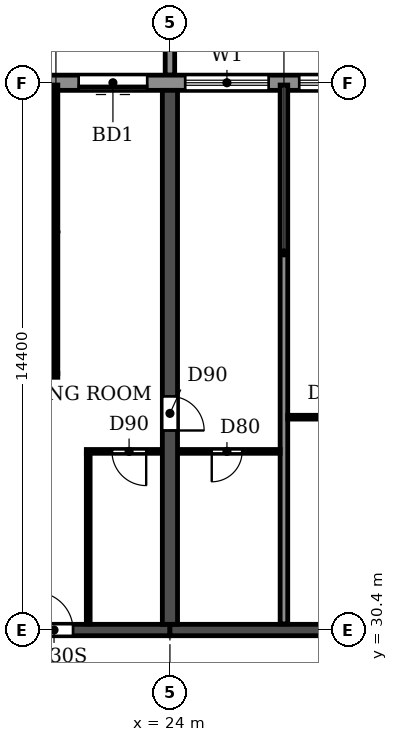
"""IFC4 building model, lengths in metres.
Left out: names, types, materials, properties, quantities, classifications, styles, units other than length and angle.
Written with IfcOpenShell. Run it as: python <this file> out.ifc"""

import sys

from ifc_helpers import new_model, si_unit, direction, frame, frame_2d, origin, place, context, subcontext, project, spatial, polyline, rectangle, outline, extrude, source, transform, mapped, element, fill, save


model = new_model("IFC4")
c1 = context("Model", 3, precision=1e-05, world=origin(), true_north=direction((0.0, 1.0)))
c2 = subcontext(c1, "Body", "Model", "MODEL_VIEW")
j1 = project(units=[si_unit("LENGTHUNIT", "METRE"), si_unit("PLANEANGLEUNIT", "RADIAN")], contexts=[c1])
p1 = place(None, origin())
s1 = spatial("IfcSite", under=j1, at=p1, CompositionType="ELEMENT")
p2 = place(p1, origin())
s2 = spatial("IfcBuilding", under=s1, at=p2, CompositionType="ELEMENT")
p3 = place(p2, frame((0.0, 0.0, 49.8)))
s3 = spatial("IfcBuildingStorey", under=s2, at=p3, CompositionType="ELEMENT", Elevation=49.8)
p4 = place(p3, frame((24.0, 30.55, 0.0), z_axis=(0.0, 0.0, 1.0), x_axis=(0.0, 1.0, 0.0)))
e1 = element("IfcWall", 1, at=p4, inside=s3, PredefinedType="SHEAR", context=c2, shape_type="SweptSolid", body=[
    extrude(rectangle(XDim=14.05, YDim=0.4, at=frame_2d((7.025, 0.0))), origin(), (0.0, 0.0, 1.0), 3.0),
])
p5 = place(p4, frame((5.1, 0.0, 0.0)))
e2 = element("IfcOpeningElement", 2, at=p5, cuts=e1, PredefinedType="OPENING", context=c2, shape_type="SweptSolid", body=[
    extrude(rectangle(XDim=0.9, YDim=2.1, at=frame_2d((0.45, 1.05))), frame((0.0, 0.21, 0.0), z_axis=(0.0, -1.0, 0.0), x_axis=(1.0, 0.0, 0.0)), (0.0, 0.0, 1.0), 0.42),
])
p6 = place(p3, frame((18.0, 30.4, 0.0), z_axis=(0.0, 0.0, 1.0), x_axis=(1.0, 0.0, 0.0)))
e3 = element("IfcWall", 3, at=p6, inside=s3, PredefinedType="SHEAR", context=c2, shape_type="SweptSolid", body=[
    extrude(rectangle(XDim=6.0, YDim=0.3, at=frame_2d((3.0, 0.0))), origin(), (0.0, 0.0, 1.0), 2.4),
])
p7 = place(p6, frame((2.45, 0.0, 0.0)))
e4 = element("IfcOpeningElement", 4, at=p7, cuts=e3, PredefinedType="OPENING", context=c2, shape_type="SweptSolid", body=[
    extrude(rectangle(XDim=1.0, YDim=2.1, at=frame_2d((0.5, 1.05))), frame((0.0, 0.16, 0.0), z_axis=(0.0, -1.0, 0.0), x_axis=(1.0, 0.0, 0.0)), (0.0, 0.0, 1.0), 0.32),
])
p8 = place(p3, frame((24.0, 30.4, 0.0), z_axis=(0.0, 0.0, 1.0), x_axis=(1.0, 0.0, 0.0)))
e5 = element("IfcWall", 5, at=p8, inside=s3, PredefinedType="SHEAR", context=c2, shape_type="SweptSolid", body=[
    extrude(rectangle(XDim=6.0, YDim=0.3, at=frame_2d((3.0, 0.0))), origin(), (0.0, 0.0, 1.0), 2.4),
])
p9 = place(p3, frame((97.317, 44.8, 0.0), z_axis=(0.0, 0.0, 1.0), x_axis=(-1.0, 0.0, 0.0)))
e6 = element("IfcWall", 6, at=p9, inside=s3, PredefinedType="STANDARD", context=c2, shape_type="SweptSolid", body=[
    extrude(rectangle(XDim=92.634, YDim=0.4, at=frame_2d((46.317, 0.0))), origin(), (0.0, 0.0, 1.0), 3.0),
])
p10 = place(p9, frame((88.917, 0.0, 0.0)))
e7 = element("IfcOpeningElement", 7, at=p10, cuts=e6, PredefinedType="OPENING", context=c2, shape_type="SweptSolid", body=[
    extrude(rectangle(XDim=1.8, YDim=2.4, at=frame_2d((0.9, 1.2))), frame((0.0, 0.21, 0.0), z_axis=(0.0, -1.0, 0.0), x_axis=(1.0, 0.0, 0.0)), (0.0, 0.0, 1.0), 0.42),
])
p11 = place(p9, frame((85.717, 0.0, 0.9)))
e8 = element("IfcOpeningElement", 8, at=p11, cuts=e6, PredefinedType="OPENING", context=c2, shape_type="SweptSolid", body=[
    extrude(rectangle(XDim=2.2, YDim=1.5, at=frame_2d((1.1, 0.75))), frame((0.0, 0.21, 0.0), z_axis=(0.0, -1.0, 0.0), x_axis=(1.0, 0.0, 0.0)), (0.0, 0.0, 1.0), 0.42),
])
p12 = place(p9, frame((82.717, 0.0, 0.9)))
e9 = element("IfcOpeningElement", 9, at=p12, cuts=e6, PredefinedType="OPENING", context=c2, shape_type="SweptSolid", body=[
    extrude(rectangle(XDim=2.2, YDim=1.5, at=frame_2d((1.1, 0.75))), frame((0.0, 0.21, 0.0), z_axis=(0.0, -1.0, 0.0), x_axis=(1.0, 0.0, 0.0)), (0.0, 0.0, 1.0), 0.42),
])
p13 = place(p9, frame((79.717, 0.0, 0.9)))
e10 = element("IfcOpeningElement", 10, at=p13, cuts=e6, PredefinedType="OPENING", context=c2, shape_type="SweptSolid", body=[
    extrude(rectangle(XDim=2.2, YDim=1.5, at=frame_2d((1.1, 0.75))), frame((0.0, 0.21, 0.0), z_axis=(0.0, -1.0, 0.0), x_axis=(1.0, 0.0, 0.0)), (0.0, 0.0, 1.0), 0.42),
])
p14 = place(p9, frame((76.717, 0.0, 0.9)))
e11 = element("IfcOpeningElement", 11, at=p14, cuts=e6, PredefinedType="OPENING", context=c2, shape_type="SweptSolid", body=[
    extrude(rectangle(XDim=2.2, YDim=1.5, at=frame_2d((1.1, 0.75))), frame((0.0, 0.21, 0.0), z_axis=(0.0, -1.0, 0.0), x_axis=(1.0, 0.0, 0.0)), (0.0, 0.0, 1.0), 0.42),
])
p15 = place(p9, frame((73.917, 0.0, 0.0)))
e12 = element("IfcOpeningElement", 12, at=p15, cuts=e6, PredefinedType="OPENING", context=c2, shape_type="SweptSolid", body=[
    extrude(rectangle(XDim=1.8, YDim=2.4, at=frame_2d((0.9, 1.2))), frame((0.0, 0.21, 0.0), z_axis=(0.0, -1.0, 0.0), x_axis=(1.0, 0.0, 0.0)), (0.0, 0.0, 1.0), 0.42),
])
p16 = place(p9, frame((70.717, 0.0, 0.9)))
e13 = element("IfcOpeningElement", 13, at=p16, cuts=e6, PredefinedType="OPENING", context=c2, shape_type="SweptSolid", body=[
    extrude(rectangle(XDim=2.2, YDim=1.5, at=frame_2d((1.1, 0.75))), frame((0.0, 0.21, 0.0), z_axis=(0.0, -1.0, 0.0), x_axis=(1.0, 0.0, 0.0)), (0.0, 0.0, 1.0), 0.42),
])
p17 = place(p9, frame((67.717, 0.0, 0.9)))
e14 = element("IfcOpeningElement", 14, at=p17, cuts=e6, PredefinedType="OPENING", context=c2, shape_type="SweptSolid", body=[
    extrude(rectangle(XDim=2.2, YDim=1.5, at=frame_2d((1.1, 0.75))), frame((0.0, 0.21, 0.0), z_axis=(0.0, -1.0, 0.0), x_axis=(1.0, 0.0, 0.0)), (0.0, 0.0, 1.0), 0.42),
])
p18 = place(p9, frame((64.717, 0.0, 0.9)))
e15 = element("IfcOpeningElement", 15, at=p18, cuts=e6, PredefinedType="OPENING", context=c2, shape_type="SweptSolid", body=[
    extrude(rectangle(XDim=2.2, YDim=1.5, at=frame_2d((1.1, 0.75))), frame((0.0, 0.21, 0.0), z_axis=(0.0, -1.0, 0.0), x_axis=(1.0, 0.0, 0.0)), (0.0, 0.0, 1.0), 0.42),
])
p19 = place(p9, frame((61.917, 0.0, 0.0)))
e16 = element("IfcOpeningElement", 16, at=p19, cuts=e6, PredefinedType="OPENING", context=c2, shape_type="SweptSolid", body=[
    extrude(rectangle(XDim=1.8, YDim=2.4, at=frame_2d((0.9, 1.2))), frame((0.0, 0.21, 0.0), z_axis=(0.0, -1.0, 0.0), x_axis=(1.0, 0.0, 0.0)), (0.0, 0.0, 1.0), 0.42),
])
p20 = place(p9, frame((58.717, 0.0, 0.9)))
e17 = element("IfcOpeningElement", 17, at=p20, cuts=e6, PredefinedType="OPENING", context=c2, shape_type="SweptSolid", body=[
    extrude(rectangle(XDim=2.2, YDim=1.5, at=frame_2d((1.1, 0.75))), frame((0.0, 0.21, 0.0), z_axis=(0.0, -1.0, 0.0), x_axis=(1.0, 0.0, 0.0)), (0.0, 0.0, 1.0), 0.42),
])
p21 = place(p9, frame((55.717, 0.0, 0.9)))
e18 = element("IfcOpeningElement", 18, at=p21, cuts=e6, PredefinedType="OPENING", context=c2, shape_type="SweptSolid", body=[
    extrude(rectangle(XDim=2.2, YDim=1.5, at=frame_2d((1.1, 0.75))), frame((0.0, 0.21, 0.0), z_axis=(0.0, -1.0, 0.0), x_axis=(1.0, 0.0, 0.0)), (0.0, 0.0, 1.0), 0.42),
])
p22 = place(p9, frame((52.717, 0.0, 0.9)))
e19 = element("IfcOpeningElement", 19, at=p22, cuts=e6, PredefinedType="OPENING", context=c2, shape_type="SweptSolid", body=[
    extrude(rectangle(XDim=2.2, YDim=1.5, at=frame_2d((1.1, 0.75))), frame((0.0, 0.21, 0.0), z_axis=(0.0, -1.0, 0.0), x_axis=(1.0, 0.0, 0.0)), (0.0, 0.0, 1.0), 0.42),
])
p23 = place(p9, frame((49.917, 0.0, 0.0)))
e20 = element("IfcOpeningElement", 20, at=p23, cuts=e6, PredefinedType="OPENING", context=c2, shape_type="SweptSolid", body=[
    extrude(rectangle(XDim=1.8, YDim=2.4, at=frame_2d((0.9, 1.2))), frame((0.0, 0.21, 0.0), z_axis=(0.0, -1.0, 0.0), x_axis=(1.0, 0.0, 0.0)), (0.0, 0.0, 1.0), 0.42),
])
p24 = place(p9, frame((46.717, 0.0, 0.9)))
e21 = element("IfcOpeningElement", 21, at=p24, cuts=e6, PredefinedType="OPENING", context=c2, shape_type="SweptSolid", body=[
    extrude(rectangle(XDim=2.2, YDim=1.5, at=frame_2d((1.1, 0.75))), frame((0.0, 0.21, 0.0), z_axis=(0.0, -1.0, 0.0), x_axis=(1.0, 0.0, 0.0)), (0.0, 0.0, 1.0), 0.42),
])
p25 = place(p9, frame((43.717, 0.0, 0.9)))
e22 = element("IfcOpeningElement", 22, at=p25, cuts=e6, PredefinedType="OPENING", context=c2, shape_type="SweptSolid", body=[
    extrude(rectangle(XDim=2.2, YDim=1.5, at=frame_2d((1.1, 0.75))), frame((0.0, 0.21, 0.0), z_axis=(0.0, -1.0, 0.0), x_axis=(1.0, 0.0, 0.0)), (0.0, 0.0, 1.0), 0.42),
])
p26 = place(p9, frame((40.717, 0.0, 0.9)))
e23 = element("IfcOpeningElement", 23, at=p26, cuts=e6, PredefinedType="OPENING", context=c2, shape_type="SweptSolid", body=[
    extrude(rectangle(XDim=2.2, YDim=1.5, at=frame_2d((1.1, 0.75))), frame((0.0, 0.21, 0.0), z_axis=(0.0, -1.0, 0.0), x_axis=(1.0, 0.0, 0.0)), (0.0, 0.0, 1.0), 0.42),
])
p27 = place(p9, frame((37.917, 0.0, 0.0)))
e24 = element("IfcOpeningElement", 24, at=p27, cuts=e6, PredefinedType="OPENING", context=c2, shape_type="SweptSolid", body=[
    extrude(rectangle(XDim=1.8, YDim=2.4, at=frame_2d((0.9, 1.2))), frame((0.0, 0.21, 0.0), z_axis=(0.0, -1.0, 0.0), x_axis=(1.0, 0.0, 0.0)), (0.0, 0.0, 1.0), 0.42),
])
p28 = place(p9, frame((34.717, 0.0, 0.9)))
e25 = element("IfcOpeningElement", 25, at=p28, cuts=e6, PredefinedType="OPENING", context=c2, shape_type="SweptSolid", body=[
    extrude(rectangle(XDim=2.2, YDim=1.5, at=frame_2d((1.1, 0.75))), frame((0.0, 0.21, 0.0), z_axis=(0.0, -1.0, 0.0), x_axis=(1.0, 0.0, 0.0)), (0.0, 0.0, 1.0), 0.42),
])
p29 = place(p9, frame((31.717, 0.0, 0.9)))
e26 = element("IfcOpeningElement", 26, at=p29, cuts=e6, PredefinedType="OPENING", context=c2, shape_type="SweptSolid", body=[
    extrude(rectangle(XDim=2.2, YDim=1.5, at=frame_2d((1.1, 0.75))), frame((0.0, 0.21, 0.0), z_axis=(0.0, -1.0, 0.0), x_axis=(1.0, 0.0, 0.0)), (0.0, 0.0, 1.0), 0.42),
])
p30 = place(p9, frame((28.717, 0.0, 0.9)))
e27 = element("IfcOpeningElement", 27, at=p30, cuts=e6, PredefinedType="OPENING", context=c2, shape_type="SweptSolid", body=[
    extrude(rectangle(XDim=2.2, YDim=1.5, at=frame_2d((1.1, 0.75))), frame((0.0, 0.21, 0.0), z_axis=(0.0, -1.0, 0.0), x_axis=(1.0, 0.0, 0.0)), (0.0, 0.0, 1.0), 0.42),
])
p31 = place(p9, frame((25.917, 0.0, 0.0)))
e28 = element("IfcOpeningElement", 28, at=p31, cuts=e6, PredefinedType="OPENING", context=c2, shape_type="SweptSolid", body=[
    extrude(rectangle(XDim=1.8, YDim=2.4, at=frame_2d((0.9, 1.2))), frame((0.0, 0.21, 0.0), z_axis=(0.0, -1.0, 0.0), x_axis=(1.0, 0.0, 0.0)), (0.0, 0.0, 1.0), 0.42),
])
p32 = place(p9, frame((22.917, 0.0, 0.0)))
e29 = element("IfcOpeningElement", 29, at=p32, cuts=e6, PredefinedType="OPENING", context=c2, shape_type="SweptSolid", body=[
    extrude(rectangle(XDim=1.8, YDim=2.4, at=frame_2d((0.9, 1.2))), frame((0.0, 0.21, 0.0), z_axis=(0.0, -1.0, 0.0), x_axis=(1.0, 0.0, 0.0)), (0.0, 0.0, 1.0), 0.42),
])
p33 = place(p9, frame((19.717, 0.0, 0.9)))
e30 = element("IfcOpeningElement", 30, at=p33, cuts=e6, PredefinedType="OPENING", context=c2, shape_type="SweptSolid", body=[
    extrude(rectangle(XDim=2.2, YDim=1.5, at=frame_2d((1.1, 0.75))), frame((0.0, 0.21, 0.0), z_axis=(0.0, -1.0, 0.0), x_axis=(1.0, 0.0, 0.0)), (0.0, 0.0, 1.0), 0.42),
])
p34 = place(p9, frame((16.717, 0.0, 0.9)))
e31 = element("IfcOpeningElement", 31, at=p34, cuts=e6, PredefinedType="OPENING", context=c2, shape_type="SweptSolid", body=[
    extrude(rectangle(XDim=2.2, YDim=1.5, at=frame_2d((1.1, 0.75))), frame((0.0, 0.21, 0.0), z_axis=(0.0, -1.0, 0.0), x_axis=(1.0, 0.0, 0.0)), (0.0, 0.0, 1.0), 0.42),
])
p35 = place(p9, frame((13.717, 0.0, 0.9)))
e32 = element("IfcOpeningElement", 32, at=p35, cuts=e6, PredefinedType="OPENING", context=c2, shape_type="SweptSolid", body=[
    extrude(rectangle(XDim=2.2, YDim=1.5, at=frame_2d((1.1, 0.75))), frame((0.0, 0.21, 0.0), z_axis=(0.0, -1.0, 0.0), x_axis=(1.0, 0.0, 0.0)), (0.0, 0.0, 1.0), 0.42),
])
p36 = place(p9, frame((10.717, 0.0, 0.9)))
e33 = element("IfcOpeningElement", 33, at=p36, cuts=e6, PredefinedType="OPENING", context=c2, shape_type="SweptSolid", body=[
    extrude(rectangle(XDim=2.2, YDim=1.5, at=frame_2d((1.1, 0.75))), frame((0.0, 0.21, 0.0), z_axis=(0.0, -1.0, 0.0), x_axis=(1.0, 0.0, 0.0)), (0.0, 0.0, 1.0), 0.42),
])
p37 = place(p9, frame((7.917, 0.0, 0.0)))
e34 = element("IfcOpeningElement", 34, at=p37, cuts=e6, PredefinedType="OPENING", context=c2, shape_type="SweptSolid", body=[
    extrude(rectangle(XDim=1.8, YDim=2.4, at=frame_2d((0.9, 1.2))), frame((0.0, 0.21, 0.0), z_axis=(0.0, -1.0, 0.0), x_axis=(1.0, 0.0, 0.0)), (0.0, 0.0, 1.0), 0.42),
])
p38 = place(p9, frame((4.717, 0.0, 0.9)))
e35 = element("IfcOpeningElement", 35, at=p38, cuts=e6, PredefinedType="OPENING", context=c2, shape_type="SweptSolid", body=[
    extrude(rectangle(XDim=2.2, YDim=1.5, at=frame_2d((1.1, 0.75))), frame((0.0, 0.21, 0.0), z_axis=(0.0, -1.0, 0.0), x_axis=(1.0, 0.0, 0.0)), (0.0, 0.0, 1.0), 0.42),
])
p39 = place(p9, frame((1.917, 0.0, 0.0)))
e36 = element("IfcOpeningElement", 36, at=p39, cuts=e6, PredefinedType="OPENING", context=c2, shape_type="SweptSolid", body=[
    extrude(rectangle(XDim=1.8, YDim=2.4, at=frame_2d((0.9, 1.2))), frame((0.0, 0.21, 0.0), z_axis=(0.0, -1.0, 0.0), x_axis=(1.0, 0.0, 0.0)), (0.0, 0.0, 1.0), 0.42),
])
m1 = source(origin(), c2, "Body", "SweptSolid", [
    extrude(outline(polyline([(0.0, 0.0), (0.25, 0.0), (0.25, 3.1), (0.0, 3.1), (0.0, 0.0)])), origin(), (0.0, 0.0, 1.0), 3.1),
])
p40 = place(p3, frame((23.875, 45.0, 0.0)))
e37 = element("IfcWall", 37, at=p40, inside=s3, PredefinedType="STANDARD", context=c2, shape_type="MappedRepresentation", body=[
    mapped(m1, transform((0.0, 0.0, 0.0))),
])
p41 = place(p3, frame((27.0, 30.56, 0.0), z_axis=(0.0, 0.0, 1.0), x_axis=(0.0, 1.0, 0.0)))
e38 = element("IfcWall", 38, at=p41, inside=s3, PredefinedType="PARTITIONING", context=c2, shape_type="SweptSolid", body=[
    extrude(rectangle(XDim=14.18, YDim=0.2, at=frame_2d((7.09, 0.0))), origin(), (0.0, 0.0, 1.0), 3.0),
])
p42 = place(p3, frame((21.8, 35.1, 0.0), z_axis=(0.0, 0.0, 1.0), x_axis=(1.0, 0.0, 0.0)))
e39 = element("IfcWall", 39, at=p42, inside=s3, PredefinedType="PARTITIONING", context=c2, shape_type="SweptSolid", body=[
    extrude(rectangle(XDim=1.99, YDim=0.1, at=frame_2d((0.995, 0.0))), origin(), (0.0, 0.0, 1.0), 3.0),
])
p43 = place(p42, frame((0.675, 0.0, 0.0)))
e40 = element("IfcOpeningElement", 40, at=p43, cuts=e39, PredefinedType="OPENING", context=c2, shape_type="SweptSolid", body=[
    extrude(rectangle(XDim=0.9, YDim=2.1, at=frame_2d((0.45, 1.05))), frame((0.0, 0.06, 0.0), z_axis=(0.0, -1.0, 0.0), x_axis=(1.0, 0.0, 0.0)), (0.0, 0.0, 1.0), 0.12),
])
p44 = place(p3, frame((24.21, 35.1, 0.0), z_axis=(0.0, 0.0, 1.0), x_axis=(1.0, 0.0, 0.0)))
e41 = element("IfcWall", 41, at=p44, inside=s3, PredefinedType="PARTITIONING", context=c2, shape_type="SweptSolid", body=[
    extrude(rectangle(XDim=2.69, YDim=0.1, at=frame_2d((1.345, 0.0))), origin(), (0.0, 0.0, 1.0), 3.0),
])
p45 = place(p44, frame((0.89, 0.0, 0.0)))
e42 = element("IfcOpeningElement", 42, at=p45, cuts=e41, PredefinedType="OPENING", context=c2, shape_type="SweptSolid", body=[
    extrude(rectangle(XDim=0.8, YDim=2.1, at=frame_2d((0.4, 1.05))), frame((0.0, 0.06, 0.0), z_axis=(0.0, -1.0, 0.0), x_axis=(1.0, 0.0, 0.0)), (0.0, 0.0, 1.0), 0.12),
])
p46 = place(p3, frame((27.1, 36.0, 0.0), z_axis=(0.0, 0.0, 1.0), x_axis=(1.0, 0.0, 0.0)))
e43 = element("IfcWall", 43, at=p46, inside=s3, PredefinedType="PARTITIONING", context=c2, shape_type="SweptSolid", body=[
    extrude(rectangle(XDim=2.69, YDim=0.1, at=frame_2d((1.345, 0.0))), origin(), (0.0, 0.0, 1.0), 3.0),
])
p47 = place(p46, frame((1.0, 0.0, 0.0)))
e44 = element("IfcOpeningElement", 44, at=p47, cuts=e43, PredefinedType="OPENING", context=c2, shape_type="SweptSolid", body=[
    extrude(rectangle(XDim=0.8, YDim=2.1, at=frame_2d((0.4, 1.05))), frame((0.0, 0.06, 0.0), z_axis=(0.0, -1.0, 0.0), x_axis=(1.0, 0.0, 0.0)), (0.0, 0.0, 1.0), 0.12),
])
p48 = place(p3, frame((18.21, 37.1, 0.0), z_axis=(0.0, 0.0, 1.0), x_axis=(1.0, 0.0, 0.0)))
e45 = element("IfcWall", 45, at=p48, inside=s3, PredefinedType="PARTITIONING", context=c2, shape_type="SweptSolid", body=[
    extrude(rectangle(XDim=2.84, YDim=0.1, at=frame_2d((1.42, 0.0))), origin(), (0.0, 0.0, 1.0), 3.0),
])
p49 = place(p48, frame((0.29, 0.0, 0.0)))
e46 = element("IfcOpeningElement", 46, at=p49, cuts=e45, PredefinedType="OPENING", context=c2, shape_type="SweptSolid", body=[
    extrude(rectangle(XDim=0.9, YDim=2.1, at=frame_2d((0.45, 1.05))), frame((0.0, 0.06, 0.0), z_axis=(0.0, -1.0, 0.0), x_axis=(1.0, 0.0, 0.0)), (0.0, 0.0, 1.0), 0.12),
])
p50 = place(p3, frame((21.0, 37.15, 0.0), z_axis=(0.0, 0.0, 1.0), x_axis=(0.0, 1.0, 0.0)))
e47 = element("IfcWall", 47, at=p50, inside=s3, PredefinedType="PARTITIONING", context=c2, shape_type="SweptSolid", body=[
    extrude(rectangle(XDim=7.59, YDim=0.1, at=frame_2d((3.795, 0.0))), origin(), (0.0, 0.0, 1.0), 3.0),
])
p51 = place(p3, frame((21.85, 30.56, 0.0), z_axis=(0.0, 0.0, 1.0), x_axis=(0.0, 1.0, 0.0)))
e48 = element("IfcWall", 48, at=p51, inside=s3, PredefinedType="PARTITIONING", context=c2, shape_type="SweptSolid", body=[
    extrude(rectangle(XDim=4.49, YDim=0.1, at=frame_2d((2.245, 0.0))), origin(), (0.0, 0.0, 1.0), 3.0),
])
p52 = place(p15, origin())
e49 = element("IfcDoor", 49, at=p52, inside=s3, OperationType="DOUBLE_DOOR_SLIDING", PredefinedType="DOOR", context=c2, shape_type="SweptSolid", body=[
    extrude(rectangle(XDim=1.8, YDim=2.4, at=frame_2d((0.9, 1.2))), frame((0.0, 0.025, 0.0), z_axis=(0.0, -1.0, 0.0), x_axis=(1.0, 0.0, 0.0)), (0.0, 0.0, 1.0), 0.05),
])
fill(e12, e49)
p53 = place(p16, origin())
e50 = element("IfcWindow", 50, at=p53, inside=s3, PartitioningType="DOUBLE_PANEL_HORIZONTAL", PredefinedType="WINDOW", context=c2, shape_type="SweptSolid", body=[
    extrude(rectangle(XDim=2.2, YDim=1.5, at=frame_2d((1.1, 0.75))), frame((0.0, 0.03, 0.0), z_axis=(0.0, -1.0, 0.0), x_axis=(1.0, 0.0, 0.0)), (0.0, 0.0, 1.0), 0.06),
])
fill(e13, e50)
p54 = place(p17, origin())
e51 = element("IfcWindow", 51, at=p54, inside=s3, PartitioningType="DOUBLE_PANEL_HORIZONTAL", PredefinedType="WINDOW", context=c2, shape_type="SweptSolid", body=[
    extrude(rectangle(XDim=2.2, YDim=1.5, at=frame_2d((1.1, 0.75))), frame((0.0, 0.03, 0.0), z_axis=(0.0, -1.0, 0.0), x_axis=(1.0, 0.0, 0.0)), (0.0, 0.0, 1.0), 0.06),
])
fill(e14, e51)
p55 = place(p45, frame((0.8, 0.0, 0.0), z_axis=(0.0, 0.0, 1.0), x_axis=(-1.0, 0.0, 0.0)))
e52 = element("IfcDoor", 52, at=p55, inside=s3, OperationType="SINGLE_SWING_RIGHT", PredefinedType="DOOR", context=c2, shape_type="SweptSolid", body=[
    extrude(rectangle(XDim=0.8, YDim=2.1, at=frame_2d((0.4, 1.05))), frame((0.0, 0.025, 0.0), z_axis=(0.0, -1.0, 0.0), x_axis=(1.0, 0.0, 0.0)), (0.0, 0.0, 1.0), 0.05),
])
fill(e42, e52)
p56 = place(p7, origin())
e53 = element("IfcDoor", 53, at=p56, inside=s3, OperationType="SINGLE_SWING_LEFT", PredefinedType="DOOR", context=c2, shape_type="SweptSolid", body=[
    extrude(rectangle(XDim=1.0, YDim=2.1, at=frame_2d((0.5, 1.05))), frame((0.0, 0.025, 0.0), z_axis=(0.0, -1.0, 0.0), x_axis=(1.0, 0.0, 0.0)), (0.0, 0.0, 1.0), 0.05),
])
fill(e4, e53)
p57 = place(p43, frame((0.9, 0.0, 0.0), z_axis=(0.0, 0.0, 1.0), x_axis=(-1.0, 0.0, 0.0)))
e54 = element("IfcDoor", 54, at=p57, inside=s3, OperationType="SINGLE_SWING_LEFT", PredefinedType="DOOR", context=c2, shape_type="SweptSolid", body=[
    extrude(rectangle(XDim=0.9, YDim=2.1, at=frame_2d((0.45, 1.05))), frame((0.0, 0.025, 0.0), z_axis=(0.0, -1.0, 0.0), x_axis=(1.0, 0.0, 0.0)), (0.0, 0.0, 1.0), 0.05),
])
fill(e40, e54)
p58 = place(p5, frame((0.9, 0.0, 0.0), z_axis=(0.0, 0.0, 1.0), x_axis=(-1.0, 0.0, 0.0)))
e55 = element("IfcDoor", 55, at=p58, inside=s3, OperationType="SINGLE_SWING_RIGHT", PredefinedType="DOOR", context=c2, shape_type="SweptSolid", body=[
    extrude(rectangle(XDim=0.9, YDim=2.1, at=frame_2d((0.45, 1.05))), frame((0.0, 0.025, 0.0), z_axis=(0.0, -1.0, 0.0), x_axis=(1.0, 0.0, 0.0)), (0.0, 0.0, 1.0), 0.05),
])
fill(e2, e55)
save(model, sys.argv[1])
